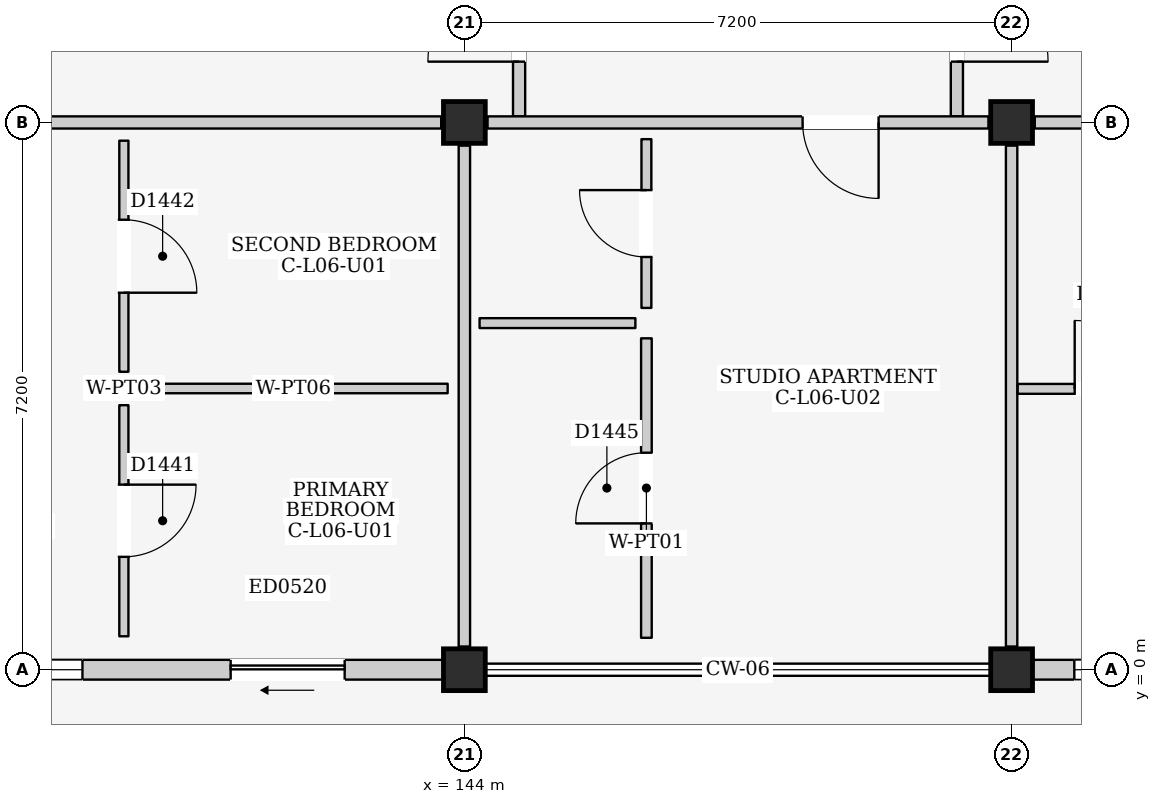
"""IFC4 building model, lengths in metres.
Left out: names, types, materials, properties, quantities, classifications, styles, units other than length and angle.
Written with IfcOpenShell. Run it as: python <this file> out.ifc"""

import sys

from ifc_helpers import new_model, si_unit, direction, frame, frame_2d, origin, origin_2d, place, context, subcontext, project, spatial, rectangle, extrude, element, fill, save


model = new_model("IFC4")
c1 = context("Model", 3, precision=1e-05, world=origin(), true_north=direction((0.0, 1.0)))
c2 = subcontext(c1, "Body", "Model", "MODEL_VIEW")
j1 = project(units=[si_unit("LENGTHUNIT", "METRE"), si_unit("PLANEANGLEUNIT", "RADIAN")], contexts=[c1])
p1 = place(None, origin())
s1 = spatial("IfcSite", under=j1, at=p1, CompositionType="ELEMENT")
p2 = place(p1, origin())
s2 = spatial("IfcBuilding", under=s1, at=p2, CompositionType="ELEMENT")
p3 = place(p2, frame((0.0, 0.0, 21.9)))
s3 = spatial("IfcBuildingStorey", under=s2, at=p3, CompositionType="ELEMENT", Elevation=21.9)
for number, where, z_axis, x_axis in (
    (1, (144.0, 0.0, 0.0), (0.0, 0.0, 1.0), (1.0, 0.0, 0.0)),
    (2, (144.0, 7.2, 0.0), (0.0, 0.0, 1.0), (1.0, 0.0, 0.0)),
    (3, (151.2, 0.0, 0.0), (0.0, 0.0, 1.0), (1.0, 0.0, 0.0)),
    (4, (151.2, 7.2, 0.0), (0.0, 0.0, 1.0), (1.0, 0.0, 0.0)),
):
    element("IfcColumn", number, at=place(p3, frame(where, z_axis=z_axis, x_axis=x_axis)), inside=s3, PredefinedType="COLUMN", context=c2, shape_type="SweptSolid", body=[
        extrude(rectangle(XDim=0.55, YDim=0.55, at=origin_2d()), origin(), (0.0, 0.0, 1.0), 3.2),
    ])
p4 = place(p3, frame((137.075, 0.0, 0.0), z_axis=(0.0, 0.0, 1.0), x_axis=(1.0, 0.0, 0.0)))
e5 = element("IfcWall", 5, at=p4, inside=s3, PredefinedType="ELEMENTEDWALL", context=c2, shape_type="SweptSolid", body=[
    extrude(rectangle(XDim=6.65, YDim=0.26, at=frame_2d((3.325, 0.0))), origin(), (0.0, 0.0, 1.0), 2.515),
])
p5 = place(p4, frame((3.85, 0.0, 0.0)))
e6 = element("IfcOpeningElement", 6, at=p5, cuts=e5, PredefinedType="OPENING", context=c2, shape_type="SweptSolid", body=[
    extrude(rectangle(XDim=1.5, YDim=2.12, at=frame_2d((0.75, 1.06))), frame((0.0, 0.145, 0.0), z_axis=(0.0, -1.0, 0.0), x_axis=(1.0, 0.0, 0.0)), (0.0, 0.0, 1.0), 0.29),
])
p6 = place(p4, frame((0.55, 0.0, 0.9)))
e7 = element("IfcOpeningElement", 7, at=p6, cuts=e5, PredefinedType="OPENING", context=c2, shape_type="SweptSolid", body=[
    extrude(rectangle(XDim=1.35, YDim=1.5, at=frame_2d((0.675, 0.75))), frame((0.0, 0.145, 0.0), z_axis=(0.0, -1.0, 0.0), x_axis=(1.0, 0.0, 0.0)), (0.0, 0.0, 1.0), 0.29),
])
p7 = place(p3, frame((151.475, 0.0, 0.0), z_axis=(0.0, 0.0, 1.0), x_axis=(1.0, 0.0, 0.0)))
e8 = element("IfcWall", 8, at=p7, inside=s3, PredefinedType="ELEMENTEDWALL", context=c2, shape_type="SweptSolid", body=[
    extrude(rectangle(XDim=6.65, YDim=0.26, at=frame_2d((3.325, 0.0))), origin(), (0.0, 0.0, 1.0), 2.515),
])
p8 = place(p7, frame((3.85, 0.0, 0.0)))
e9 = element("IfcOpeningElement", 9, at=p8, cuts=e8, PredefinedType="OPENING", context=c2, shape_type="SweptSolid", body=[
    extrude(rectangle(XDim=2.0, YDim=2.12, at=frame_2d((1.0, 1.06))), frame((0.0, 0.145, 0.0), z_axis=(0.0, -1.0, 0.0), x_axis=(1.0, 0.0, 0.0)), (0.0, 0.0, 1.0), 0.29),
])
p9 = place(p7, frame((0.55, 0.0, 0.9)))
e10 = element("IfcOpeningElement", 10, at=p9, cuts=e8, PredefinedType="OPENING", context=c2, shape_type="SweptSolid", body=[
    extrude(rectangle(XDim=1.45, YDim=1.4, at=frame_2d((0.725, 0.7))), frame((0.0, 0.145, 0.0), z_axis=(0.0, -1.0, 0.0), x_axis=(1.0, 0.0, 0.0)), (0.0, 0.0, 1.0), 0.29),
])
p10 = place(p3, frame((144.72, 7.28, 0.0), z_axis=(0.0, 0.0, 1.0), x_axis=(0.0, 1.0, 0.0)))
e11 = element("IfcWall", 11, at=p10, inside=s3, PredefinedType="PARTITIONING", context=c2, shape_type="SweptSolid", body=[
    extrude(rectangle(XDim=4.32, YDim=0.16, at=frame_2d((2.16, 0.0))), origin(), (0.0, 0.0, 1.0), 2.98),
])
p11 = place(p10, frame((0.72, 0.0, 0.0)))
e12 = element("IfcOpeningElement", 12, at=p11, cuts=e11, PredefinedType="OPENING", context=c2, shape_type="SweptSolid", body=[
    extrude(rectangle(XDim=1.2, YDim=2.2, at=frame_2d((0.6, 1.1))), frame((0.0, 0.095, 0.0), z_axis=(0.0, -1.0, 0.0), x_axis=(1.0, 0.0, 0.0)), (0.0, 0.0, 1.0), 0.19),
])
p12 = place(p3, frame((150.48, 7.28, 0.0), z_axis=(0.0, 0.0, 1.0), x_axis=(0.0, 1.0, 0.0)))
e13 = element("IfcWall", 13, at=p12, inside=s3, PredefinedType="PARTITIONING", context=c2, shape_type="SweptSolid", body=[
    extrude(rectangle(XDim=4.32, YDim=0.16, at=frame_2d((2.16, 0.0))), origin(), (0.0, 0.0, 1.0), 2.98),
])
p13 = place(p12, frame((0.72, 0.0, 0.0)))
e14 = element("IfcOpeningElement", 14, at=p13, cuts=e13, PredefinedType="OPENING", context=c2, shape_type="SweptSolid", body=[
    extrude(rectangle(XDim=1.2, YDim=2.2, at=frame_2d((0.6, 1.1))), frame((0.0, 0.095, 0.0), z_axis=(0.0, -1.0, 0.0), x_axis=(1.0, 0.0, 0.0)), (0.0, 0.0, 1.0), 0.19),
])
p14 = place(p3, frame((137.105, 7.2, 0.0), z_axis=(0.0, 0.0, 1.0), x_axis=(1.0, 0.0, 0.0)))
e15 = element("IfcWall", 15, at=p14, inside=s3, PredefinedType="PARTITIONING", context=c2, shape_type="SweptSolid", body=[
    extrude(rectangle(XDim=6.59, YDim=0.16, at=frame_2d((3.295, 0.0))), origin(), (0.0, 0.0, 1.0), 2.365),
])
p15 = place(p3, frame((144.0, 0.305, 0.0), z_axis=(0.0, 0.0, 1.0), x_axis=(0.0, 1.0, 0.0)))
e16 = element("IfcWall", 16, at=p15, inside=s3, PredefinedType="PARTITIONING", context=c2, shape_type="SweptSolid", body=[
    extrude(rectangle(XDim=6.59, YDim=0.15, at=frame_2d((3.295, 0.0))), origin(), (0.0, 0.0, 1.0), 2.465),
])
p16 = place(p3, frame((139.52, 0.44, 0.0), z_axis=(0.0, 0.0, 1.0), x_axis=(0.0, 1.0, 0.0)))
e17 = element("IfcWall", 17, at=p16, inside=s3, PredefinedType="PARTITIONING", context=c2, shape_type="SweptSolid", body=[
    extrude(rectangle(XDim=3.04, YDim=0.12, at=frame_2d((1.52, 0.0))), origin(), (0.0, 0.0, 1.0), 2.98),
])
p17 = place(p16, frame((1.045, 0.0, 0.0)))
e18 = element("IfcOpeningElement", 18, at=p17, cuts=e17, PredefinedType="OPENING", context=c2, shape_type="SweptSolid", body=[
    extrude(rectangle(XDim=0.95, YDim=2.15, at=frame_2d((0.475, 1.075))), frame((0.0, 0.075, 0.0), z_axis=(0.0, -1.0, 0.0), x_axis=(1.0, 0.0, 0.0)), (0.0, 0.0, 1.0), 0.15),
])
p18 = place(p3, frame((139.72, 3.7, 0.0), z_axis=(0.0, 0.0, 1.0), x_axis=(1.0, 0.0, 0.0)))
e19 = element("IfcWall", 19, at=p18, inside=s3, PredefinedType="PARTITIONING", context=c2, shape_type="SweptSolid", body=[
    extrude(rectangle(XDim=4.06, YDim=0.125, at=frame_2d((2.03, 0.0))), origin(), (0.0, 0.0, 1.0), 2.98),
])
p19 = place(p3, frame((139.52, 3.92, 0.0), z_axis=(0.0, 0.0, 1.0), x_axis=(0.0, 1.0, 0.0)))
e20 = element("IfcWall", 20, at=p19, inside=s3, PredefinedType="PARTITIONING", context=c2, shape_type="SweptSolid", body=[
    extrude(rectangle(XDim=3.04, YDim=0.12, at=frame_2d((1.52, 0.0))), origin(), (0.0, 0.0, 1.0), 2.98),
])
p20 = place(p19, frame((1.04, 0.0, 0.0)))
e21 = element("IfcOpeningElement", 21, at=p20, cuts=e20, PredefinedType="OPENING", context=c2, shape_type="SweptSolid", body=[
    extrude(rectangle(XDim=0.96, YDim=2.15, at=frame_2d((0.48, 1.075))), frame((0.0, 0.075, 0.0), z_axis=(0.0, -1.0, 0.0), x_axis=(1.0, 0.0, 0.0)), (0.0, 0.0, 1.0), 0.15),
])
p21 = place(p3, frame((144.305, 7.2, 0.0), z_axis=(0.0, 0.0, 1.0), x_axis=(1.0, 0.0, 0.0)))
e22 = element("IfcWall", 22, at=p21, inside=s3, PredefinedType="PARTITIONING", context=c2, shape_type="SweptSolid", body=[
    extrude(rectangle(XDim=6.59, YDim=0.16, at=frame_2d((3.295, 0.0))), origin(), (0.0, 0.0, 1.0), 2.365),
])
p22 = place(p21, frame((4.145, 0.0, 0.0)))
e23 = element("IfcOpeningElement", 23, at=p22, cuts=e22, PredefinedType="OPENING", context=c2, shape_type="SweptSolid", body=[
    extrude(rectangle(XDim=1.0, YDim=2.15, at=frame_2d((0.5, 1.075))), frame((0.0, 0.095, 0.0), z_axis=(0.0, -1.0, 0.0), x_axis=(1.0, 0.0, 0.0)), (0.0, 0.0, 1.0), 0.19),
])
p23 = place(p3, frame((151.2, 0.305, 0.0), z_axis=(0.0, 0.0, 1.0), x_axis=(0.0, 1.0, 0.0)))
e24 = element("IfcWall", 24, at=p23, inside=s3, PredefinedType="PARTITIONING", context=c2, shape_type="SweptSolid", body=[
    extrude(rectangle(XDim=6.59, YDim=0.15, at=frame_2d((3.295, 0.0))), origin(), (0.0, 0.0, 1.0), 2.465),
])
p24 = place(p3, frame((144.2, 4.56, 0.0), z_axis=(0.0, 0.0, 1.0), x_axis=(1.0, 0.0, 0.0)))
e25 = element("IfcWall", 25, at=p24, inside=s3, PredefinedType="PARTITIONING", context=c2, shape_type="SweptSolid", body=[
    extrude(rectangle(XDim=2.05, YDim=0.13, at=frame_2d((1.025, 0.0))), origin(), (0.0, 0.0, 1.0), 2.98),
])
p25 = place(p3, frame((146.395, 4.76, 0.0), z_axis=(0.0, 0.0, 1.0), x_axis=(0.0, 1.0, 0.0)))
e26 = element("IfcWall", 26, at=p25, inside=s3, PredefinedType="PARTITIONING", context=c2, shape_type="SweptSolid", body=[
    extrude(rectangle(XDim=2.22, YDim=0.13, at=frame_2d((1.11, 0.0))), origin(), (0.0, 0.0, 1.0), 2.98),
])
p26 = place(p25, frame((0.67, 0.0, 0.0)))
e27 = element("IfcOpeningElement", 27, at=p26, cuts=e26, PredefinedType="OPENING", context=c2, shape_type="SweptSolid", body=[
    extrude(rectangle(XDim=0.88, YDim=2.1, at=frame_2d((0.44, 1.05))), frame((0.0, 0.08, 0.0), z_axis=(0.0, -1.0, 0.0), x_axis=(1.0, 0.0, 0.0)), (0.0, 0.0, 1.0), 0.16),
])
p27 = place(p3, frame((146.395, 0.42, 0.0), z_axis=(0.0, 0.0, 1.0), x_axis=(0.0, 1.0, 0.0)))
e28 = element("IfcWall", 28, at=p27, inside=s3, PredefinedType="PARTITIONING", context=c2, shape_type="SweptSolid", body=[
    extrude(rectangle(XDim=3.94, YDim=0.14, at=frame_2d((1.97, 0.0))), origin(), (0.0, 0.0, 1.0), 2.98),
])
p28 = place(p27, frame((1.505, 0.0, 0.0)))
e29 = element("IfcOpeningElement", 29, at=p28, cuts=e28, PredefinedType="OPENING", context=c2, shape_type="SweptSolid", body=[
    extrude(rectangle(XDim=0.93, YDim=2.14, at=frame_2d((0.465, 1.07))), frame((0.0, 0.085, 0.0), z_axis=(0.0, -1.0, 0.0), x_axis=(1.0, 0.0, 0.0)), (0.0, 0.0, 1.0), 0.17),
])
p29 = place(p3, frame((151.505, 7.2, 0.0), z_axis=(0.0, 0.0, 1.0), x_axis=(1.0, 0.0, 0.0)))
e30 = element("IfcWall", 30, at=p29, inside=s3, PredefinedType="PARTITIONING", context=c2, shape_type="SweptSolid", body=[
    extrude(rectangle(XDim=6.59, YDim=0.16, at=frame_2d((3.295, 0.0))), origin(), (0.0, 0.0, 1.0), 2.365),
])
p30 = place(p29, frame((5.325, 0.0, 0.0)))
e31 = element("IfcOpeningElement", 31, at=p30, cuts=e30, PredefinedType="OPENING", context=c2, shape_type="SweptSolid", body=[
    extrude(rectangle(XDim=1.0, YDim=2.15, at=frame_2d((0.5, 1.075))), frame((0.0, 0.095, 0.0), z_axis=(0.0, -1.0, 0.0), x_axis=(1.0, 0.0, 0.0)), (0.0, 0.0, 1.0), 0.19),
])
p31 = place(p3, frame((151.28, 3.695, 0.0), z_axis=(0.0, 0.0, 1.0), x_axis=(1.0, 0.0, 0.0)))
e32 = element("IfcWall", 32, at=p31, inside=s3, PredefinedType="PARTITIONING", context=c2, shape_type="SweptSolid", body=[
    extrude(rectangle(XDim=2.4, YDim=0.13, at=frame_2d((1.2, 0.0))), origin(), (0.0, 0.0, 1.0), 2.98),
])
p32 = place(p31, frame((0.75, 0.0, 0.0)))
e33 = element("IfcOpeningElement", 33, at=p32, cuts=e32, PredefinedType="OPENING", context=c2, shape_type="SweptSolid", body=[
    extrude(rectangle(XDim=0.9, YDim=2.1, at=frame_2d((0.45, 1.05))), frame((0.0, 0.08, 0.0), z_axis=(0.0, -1.0, 0.0), x_axis=(1.0, 0.0, 0.0)), (0.0, 0.0, 1.0), 0.16),
])
p33 = place(p5, frame((1.5, 0.0, 0.0), z_axis=(0.0, 0.0, 1.0), x_axis=(-1.0, 0.0, 0.0)))
e34 = element("IfcDoor", 34, at=p33, inside=s3, OperationType="SLIDING_TO_LEFT", PredefinedType="DOOR", context=c2, shape_type="SweptSolid", body=[
    extrude(rectangle(XDim=1.5, YDim=2.12, at=frame_2d((0.75, 1.06))), frame((0.0, 0.025, 0.0), z_axis=(0.0, -1.0, 0.0), x_axis=(1.0, 0.0, 0.0)), (0.0, 0.0, 1.0), 0.05),
])
fill(e6, e34)
p34 = place(p6, origin())
e35 = element("IfcWindow", 35, at=p34, inside=s3, PartitioningType="SINGLE_PANEL", PredefinedType="WINDOW", context=c2, shape_type="SweptSolid", body=[
    extrude(rectangle(XDim=1.35, YDim=1.5, at=frame_2d((0.675, 0.75))), frame((0.0, 0.03, 0.0), z_axis=(0.0, -1.0, 0.0), x_axis=(1.0, 0.0, 0.0)), (0.0, 0.0, 1.0), 0.06),
])
fill(e7, e35)
p35 = place(p9, origin())
e36 = element("IfcWindow", 36, at=p35, inside=s3, PartitioningType="DOUBLE_PANEL_VERTICAL", PredefinedType="WINDOW", context=c2, shape_type="SweptSolid", body=[
    extrude(rectangle(XDim=1.45, YDim=1.4, at=frame_2d((0.725, 0.7))), frame((0.0, 0.03, 0.0), z_axis=(0.0, -1.0, 0.0), x_axis=(1.0, 0.0, 0.0)), (0.0, 0.0, 1.0), 0.06),
])
fill(e10, e36)
p36 = place(p11, origin())
e37 = element("IfcDoor", 37, at=p36, inside=s3, OperationType="SINGLE_SWING_LEFT", PredefinedType="DOOR", context=c2, shape_type="SweptSolid", body=[
    extrude(rectangle(XDim=1.2, YDim=2.2, at=frame_2d((0.6, 1.1))), frame((0.0, 0.025, 0.0), z_axis=(0.0, -1.0, 0.0), x_axis=(1.0, 0.0, 0.0)), (0.0, 0.0, 1.0), 0.05),
])
fill(e12, e37)
p37 = place(p13, frame((1.2, 0.0, 0.0), z_axis=(0.0, 0.0, 1.0), x_axis=(-1.0, 0.0, 0.0)))
e38 = element("IfcDoor", 38, at=p37, inside=s3, OperationType="SINGLE_SWING_RIGHT", PredefinedType="DOOR", context=c2, shape_type="SweptSolid", body=[
    extrude(rectangle(XDim=1.2, YDim=2.2, at=frame_2d((0.6, 1.1))), frame((0.0, 0.025, 0.0), z_axis=(0.0, -1.0, 0.0), x_axis=(1.0, 0.0, 0.0)), (0.0, 0.0, 1.0), 0.05),
])
fill(e14, e38)
p38 = place(p17, frame((0.95, 0.0, 0.0), z_axis=(0.0, 0.0, 1.0), x_axis=(-1.0, 0.0, 0.0)))
e39 = element("IfcDoor", 39, at=p38, inside=s3, OperationType="SINGLE_SWING_LEFT", PredefinedType="DOOR", context=c2, shape_type="SweptSolid", body=[
    extrude(rectangle(XDim=0.95, YDim=2.15, at=frame_2d((0.475, 1.075))), frame((0.0, 0.025, 0.0), z_axis=(0.0, -1.0, 0.0), x_axis=(1.0, 0.0, 0.0)), (0.0, 0.0, 1.0), 0.05),
])
fill(e18, e39)
p39 = place(p20, frame((0.96, 0.0, 0.0), z_axis=(0.0, 0.0, 1.0), x_axis=(-1.0, 0.0, 0.0)))
e40 = element("IfcDoor", 40, at=p39, inside=s3, OperationType="SINGLE_SWING_RIGHT", PredefinedType="DOOR", context=c2, shape_type="SweptSolid", body=[
    extrude(rectangle(XDim=0.96, YDim=2.15, at=frame_2d((0.48, 1.075))), frame((0.0, 0.025, 0.0), z_axis=(0.0, -1.0, 0.0), x_axis=(1.0, 0.0, 0.0)), (0.0, 0.0, 1.0), 0.05),
])
fill(e21, e40)
p40 = place(p22, frame((1.0, 0.0, 0.0), z_axis=(0.0, 0.0, 1.0), x_axis=(-1.0, 0.0, 0.0)))
e41 = element("IfcDoor", 41, at=p40, inside=s3, OperationType="SINGLE_SWING_LEFT", PredefinedType="DOOR", context=c2, shape_type="SweptSolid", body=[
    extrude(rectangle(XDim=1.0, YDim=2.15, at=frame_2d((0.5, 1.075))), frame((0.0, 0.025, 0.0), z_axis=(0.0, -1.0, 0.0), x_axis=(1.0, 0.0, 0.0)), (0.0, 0.0, 1.0), 0.05),
])
fill(e23, e41)
p41 = place(p26, origin())
e42 = element("IfcDoor", 42, at=p41, inside=s3, OperationType="SINGLE_SWING_RIGHT", PredefinedType="DOOR", context=c2, shape_type="SweptSolid", body=[
    extrude(rectangle(XDim=0.88, YDim=2.1, at=frame_2d((0.44, 1.05))), frame((0.0, 0.025, 0.0), z_axis=(0.0, -1.0, 0.0), x_axis=(1.0, 0.0, 0.0)), (0.0, 0.0, 1.0), 0.05),
])
fill(e27, e42)
p42 = place(p28, origin())
e43 = element("IfcDoor", 43, at=p42, inside=s3, OperationType="SINGLE_SWING_LEFT", PredefinedType="DOOR", context=c2, shape_type="SweptSolid", body=[
    extrude(rectangle(XDim=0.93, YDim=2.14, at=frame_2d((0.465, 1.07))), frame((0.0, 0.025, 0.0), z_axis=(0.0, -1.0, 0.0), x_axis=(1.0, 0.0, 0.0)), (0.0, 0.0, 1.0), 0.05),
])
fill(e29, e43)
p43 = place(p32, origin())
e44 = element("IfcDoor", 44, at=p43, inside=s3, OperationType="SINGLE_SWING_LEFT", PredefinedType="DOOR", context=c2, shape_type="SweptSolid", body=[
    extrude(rectangle(XDim=0.9, YDim=2.1, at=frame_2d((0.45, 1.05))), frame((0.0, 0.025, 0.0), z_axis=(0.0, -1.0, 0.0), x_axis=(1.0, 0.0, 0.0)), (0.0, 0.0, 1.0), 0.05),
])
fill(e33, e44)
save(model, sys.argv[1])
